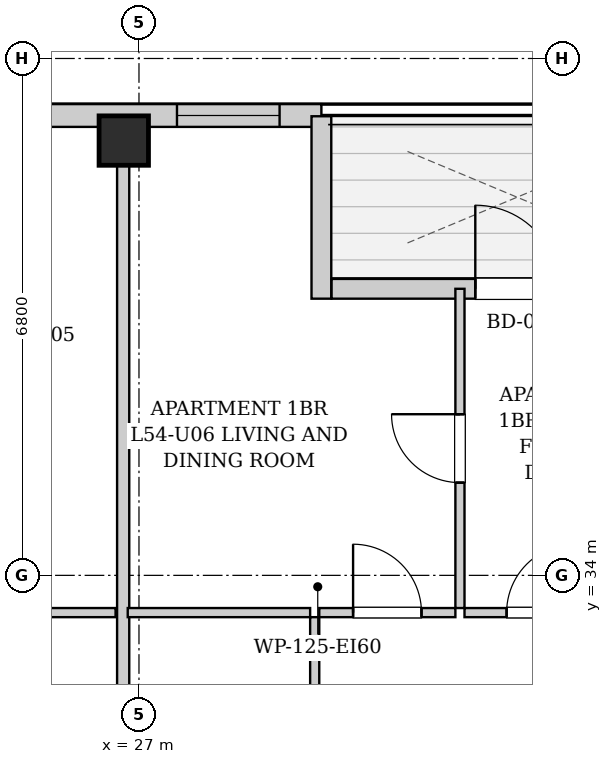
"""IFC4 building model, lengths in metres.
Left out: names, types, materials, properties, quantities, classifications, styles, units other than length and angle.
Written with IfcOpenShell. Run it as: python <this file> out.ifc"""

import sys

from ifc_helpers import new_model, si_unit, direction, frame, frame_2d, origin, origin_2d, place, context, subcontext, project, spatial, rectangle, extrude, element, fill, save


model = new_model("IFC4")
c1 = context("Model", 3, precision=1e-05, world=origin(), true_north=direction((0.0, 1.0)))
c2 = subcontext(c1, "Body", "Model", "MODEL_VIEW")
j1 = project(units=[si_unit("LENGTHUNIT", "METRE"), si_unit("PLANEANGLEUNIT", "RADIAN")], contexts=[c1])
p1 = place(None, origin())
s1 = spatial("IfcSite", under=j1, at=p1, CompositionType="ELEMENT")
p2 = place(p1, origin())
s2 = spatial("IfcBuilding", under=s1, at=p2, CompositionType="ELEMENT")
p3 = place(p2, frame((0.0, 0.0, 187.6)))
s3 = spatial("IfcBuildingStorey", under=s2, at=p3, CompositionType="ELEMENT", Elevation=187.6)
p4 = place(p3, frame((26.8, 39.72, 0.0), z_axis=(0.0, 0.0, 1.0), x_axis=(1.0, 0.0, 0.0)))
e1 = element("IfcColumn", 1, at=p4, inside=s3, PredefinedType="COLUMN", context=c2, shape_type="SweptSolid", body=[
    extrude(rectangle(XDim=0.65, YDim=0.65, at=origin_2d()), origin(), (0.0, 0.0, 1.0), 3.3),
])
p5 = place(p3, frame((19.7, 40.05, 0.0), z_axis=(0.0, 0.0, 1.0), x_axis=(1.0, 0.0, 0.0)))
e2 = element("IfcWall", 2, at=p5, inside=s3, PredefinedType="SOLIDWALL", context=c2, shape_type="SweptSolid", body=[
    extrude(rectangle(XDim=9.7, YDim=0.3, at=frame_2d((4.85, 0.0))), origin(), (0.0, 0.0, 1.0), 3.04),
])
p6 = place(p5, frame((2.12, 0.0, 0.55)))
e3 = element("IfcOpeningElement", 3, at=p6, cuts=e2, PredefinedType="OPENING", context=c2, shape_type="SweptSolid", body=[
    extrude(rectangle(XDim=0.68, YDim=1.2, at=frame_2d((0.34, 0.6))), frame((0.0, 0.16, 0.0), z_axis=(0.0, -1.0, 0.0), x_axis=(1.0, 0.0, 0.0)), (0.0, 0.0, 1.0), 0.32),
])
p7 = place(p5, frame((7.8, 0.0, 0.55)))
e4 = element("IfcOpeningElement", 4, at=p7, cuts=e2, PredefinedType="OPENING", context=c2, shape_type="SweptSolid", body=[
    extrude(rectangle(XDim=1.35, YDim=1.2, at=frame_2d((0.675, 0.6))), frame((0.0, 0.16, 0.0), z_axis=(0.0, -1.0, 0.0), x_axis=(1.0, 0.0, 0.0)), (0.0, 0.0, 1.0), 0.32),
])
p8 = place(p3, frame((29.4, 40.04, 0.0), z_axis=(0.0, 0.0, 1.0), x_axis=(0.0, -1.0, 0.0)))
e5 = element("IfcWall", 5, at=p8, inside=s3, PredefinedType="SOLIDWALL", context=c2, shape_type="SweptSolid", body=[
    extrude(rectangle(XDim=2.4, YDim=0.26, at=frame_2d((1.2, 0.0))), origin(), (0.0, 0.0, 1.0), 3.04),
])
p9 = place(p3, frame((29.534, 37.77, 0.0), z_axis=(0.0, 0.0, 1.0), x_axis=(1.0, 0.0, 0.0)))
e6 = element("IfcWall", 6, at=p9, inside=s3, PredefinedType="SOLIDWALL", context=c2, shape_type="SweptSolid", body=[
    extrude(rectangle(XDim=4.882, YDim=0.26, at=frame_2d((2.441, 0.0))), origin(), (0.0, 0.0, 1.0), 3.04),
])
p10 = place(p9, frame((1.891, 0.0, 0.0)))
e7 = element("IfcOpeningElement", 7, at=p10, cuts=e6, PredefinedType="OPENING", context=c2, shape_type="SweptSolid", body=[
    extrude(rectangle(XDim=1.1, YDim=2.0, at=frame_2d((0.55, 1.0))), frame((0.0, 0.14, 0.0), z_axis=(0.0, -1.0, 0.0), x_axis=(1.0, 0.0, 0.0)), (0.0, 0.0, 1.0), 0.28),
])
p11 = place(p9, frame((3.151, 0.0, 0.55)))
e8 = element("IfcOpeningElement", 8, at=p11, cuts=e6, PredefinedType="OPENING", context=c2, shape_type="SweptSolid", body=[
    extrude(rectangle(XDim=0.85, YDim=1.2, at=frame_2d((0.425, 0.6))), frame((0.0, 0.14, 0.0), z_axis=(0.0, -1.0, 0.0), x_axis=(1.0, 0.0, 0.0)), (0.0, 0.0, 1.0), 0.28),
])
p12 = place(p3, frame((23.535, 33.51, 0.0), z_axis=(0.0, 0.0, 1.0), x_axis=(1.0, 0.0, 0.0)))
e9 = element("IfcWall", 9, at=p12, inside=s3, PredefinedType="PARTITIONING", context=c2, shape_type="SweptSolid", body=[
    extrude(rectangle(XDim=3.157, YDim=0.12, at=frame_2d((1.579, 0.0))), origin(), (0.0, 0.0, 1.0), 3.04),
])
p13 = place(p12, frame((1.129, 0.0, 0.0)))
e10 = element("IfcOpeningElement", 10, at=p13, cuts=e9, PredefinedType="OPENING", context=c2, shape_type="SweptSolid", body=[
    extrude(rectangle(XDim=0.9, YDim=2.05, at=frame_2d((0.45, 1.025))), frame((0.0, 0.07, 0.0), z_axis=(0.0, -1.0, 0.0), x_axis=(1.0, 0.0, 0.0)), (0.0, 0.0, 1.0), 0.14),
])
p14 = place(p3, frame((26.792, 30.6, 0.0), z_axis=(0.0, 0.0, 1.0), x_axis=(0.0, 1.0, 0.0)))
e11 = element("IfcWall", 11, at=p14, inside=s3, PredefinedType="PARTITIONING", context=c2, shape_type="SweptSolid", body=[
    extrude(rectangle(XDim=9.32, YDim=0.16, at=frame_2d((4.66, 0.0))), origin(), (0.0, 0.0, 1.0), 3.04),
])
p15 = place(p3, frame((29.312, 30.6, 0.0), z_axis=(0.0, 0.0, 1.0), x_axis=(0.0, 1.0, 0.0)))
e12 = element("IfcWall", 12, at=p15, inside=s3, PredefinedType="PARTITIONING", context=c2, shape_type="SweptSolid", body=[
    extrude(rectangle(XDim=2.85, YDim=0.12, at=frame_2d((1.425, 0.0))), origin(), (0.0, 0.0, 1.0), 3.04),
])
p16 = place(p15, frame((0.995, 0.0, 0.0)))
e13 = element("IfcOpeningElement", 13, at=p16, cuts=e12, PredefinedType="OPENING", context=c2, shape_type="SweptSolid", body=[
    extrude(rectangle(XDim=0.86, YDim=2.05, at=frame_2d((0.43, 1.025))), frame((0.0, 0.07, 0.0), z_axis=(0.0, -1.0, 0.0), x_axis=(1.0, 0.0, 0.0)), (0.0, 0.0, 1.0), 0.14),
])
p17 = place(p3, frame((26.852, 33.51, 0.0), z_axis=(0.0, 0.0, 1.0), x_axis=(1.0, 0.0, 0.0)))
e14 = element("IfcWall", 14, at=p17, inside=s3, PredefinedType="PARTITIONING", context=c2, shape_type="SweptSolid", body=[
    extrude(rectangle(XDim=2.4, YDim=0.12, at=frame_2d((1.2, 0.0))), origin(), (0.0, 0.0, 1.0), 3.04),
])
p18 = place(p3, frame((29.372, 33.51, 0.0), z_axis=(0.0, 0.0, 1.0), x_axis=(1.0, 0.0, 0.0)))
e15 = element("IfcWall", 15, at=p18, inside=s3, PredefinedType="PARTITIONING", context=c2, shape_type="SweptSolid", body=[
    extrude(rectangle(XDim=1.791, YDim=0.12, at=frame_2d((0.896, 0.0))), origin(), (0.0, 0.0, 1.0), 3.04),
])
p19 = place(p18, frame((0.445, 0.0, 0.0)))
e16 = element("IfcOpeningElement", 16, at=p19, cuts=e15, PredefinedType="OPENING", context=c2, shape_type="SweptSolid", body=[
    extrude(rectangle(XDim=0.9, YDim=2.05, at=frame_2d((0.45, 1.025))), frame((0.0, 0.07, 0.0), z_axis=(0.0, -1.0, 0.0), x_axis=(1.0, 0.0, 0.0)), (0.0, 0.0, 1.0), 0.14),
])
p20 = place(p3, frame((31.283, 33.51, 0.0), z_axis=(0.0, 0.0, 1.0), x_axis=(1.0, 0.0, 0.0)))
e17 = element("IfcWall", 17, at=p20, inside=s3, PredefinedType="PARTITIONING", context=c2, shape_type="SweptSolid", body=[
    extrude(rectangle(XDim=2.009, YDim=0.12, at=frame_2d((1.004, 0.0))), origin(), (0.0, 0.0, 1.0), 3.04),
])
p21 = place(p20, frame((0.554, 0.0, 0.0)))
e18 = element("IfcOpeningElement", 18, at=p21, cuts=e17, PredefinedType="OPENING", context=c2, shape_type="SweptSolid", body=[
    extrude(rectangle(XDim=0.9, YDim=2.05, at=frame_2d((0.45, 1.025))), frame((0.0, 0.07, 0.0), z_axis=(0.0, -1.0, 0.0), x_axis=(1.0, 0.0, 0.0)), (0.0, 0.0, 1.0), 0.14),
])
p22 = place(p3, frame((31.223, 33.57, 0.0), z_axis=(0.0, 0.0, 1.0), x_axis=(0.0, 1.0, 0.0)))
e19 = element("IfcWall", 19, at=p22, inside=s3, PredefinedType="PARTITIONING", context=c2, shape_type="SweptSolid", body=[
    extrude(rectangle(XDim=4.2, YDim=0.12, at=frame_2d((2.1, 0.0))), origin(), (0.0, 0.0, 1.0), 3.04),
])
p23 = place(p22, frame((1.65, 0.0, 0.0)))
e20 = element("IfcOpeningElement", 20, at=p23, cuts=e19, PredefinedType="OPENING", context=c2, shape_type="SweptSolid", body=[
    extrude(rectangle(XDim=0.9, YDim=2.05, at=frame_2d((0.45, 1.025))), frame((0.0, 0.07, 0.0), z_axis=(0.0, -1.0, 0.0), x_axis=(1.0, 0.0, 0.0)), (0.0, 0.0, 1.0), 0.14),
])
p24 = place(p19, origin())
e21 = element("IfcDoor", 21, at=p24, inside=s3, OperationType="SINGLE_SWING_LEFT", PredefinedType="DOOR", context=c2, shape_type="SweptSolid", body=[
    extrude(rectangle(XDim=0.9, YDim=2.05, at=frame_2d((0.45, 1.025))), frame((0.0, 0.025, 0.0), z_axis=(0.0, -1.0, 0.0), x_axis=(1.0, 0.0, 0.0)), (0.0, 0.0, 1.0), 0.05),
])
fill(e16, e21)
p25 = place(p21, origin())
e22 = element("IfcDoor", 22, at=p25, inside=s3, OperationType="SINGLE_SWING_RIGHT", PredefinedType="DOOR", context=c2, shape_type="SweptSolid", body=[
    extrude(rectangle(XDim=0.9, YDim=2.05, at=frame_2d((0.45, 1.025))), frame((0.0, 0.025, 0.0), z_axis=(0.0, -1.0, 0.0), x_axis=(1.0, 0.0, 0.0)), (0.0, 0.0, 1.0), 0.05),
])
fill(e18, e22)
p26 = place(p23, origin())
e23 = element("IfcDoor", 23, at=p26, inside=s3, OperationType="SINGLE_SWING_RIGHT", PredefinedType="DOOR", context=c2, shape_type="SweptSolid", body=[
    extrude(rectangle(XDim=0.9, YDim=2.05, at=frame_2d((0.45, 1.025))), frame((0.0, 0.025, 0.0), z_axis=(0.0, -1.0, 0.0), x_axis=(1.0, 0.0, 0.0)), (0.0, 0.0, 1.0), 0.05),
])
fill(e20, e23)
p27 = place(p10, origin())
e24 = element("IfcDoor", 24, at=p27, inside=s3, OperationType="SINGLE_SWING_LEFT", PredefinedType="DOOR", context=c2, shape_type="SweptSolid", body=[
    extrude(rectangle(XDim=1.1, YDim=2.0, at=frame_2d((0.55, 1.0))), frame((0.0, 0.025, 0.0), z_axis=(0.0, -1.0, 0.0), x_axis=(1.0, 0.0, 0.0)), (0.0, 0.0, 1.0), 0.05),
])
fill(e7, e24)
p28 = place(p7, origin())
e25 = element("IfcWindow", 25, at=p28, inside=s3, PartitioningType="SINGLE_PANEL", PredefinedType="WINDOW", context=c2, shape_type="SweptSolid", body=[
    extrude(rectangle(XDim=1.35, YDim=1.2, at=frame_2d((0.675, 0.6))), frame((0.0, 0.03, 0.0), z_axis=(0.0, -1.0, 0.0), x_axis=(1.0, 0.0, 0.0)), (0.0, 0.0, 1.0), 0.06),
])
fill(e4, e25)
save(model, sys.argv[1])
